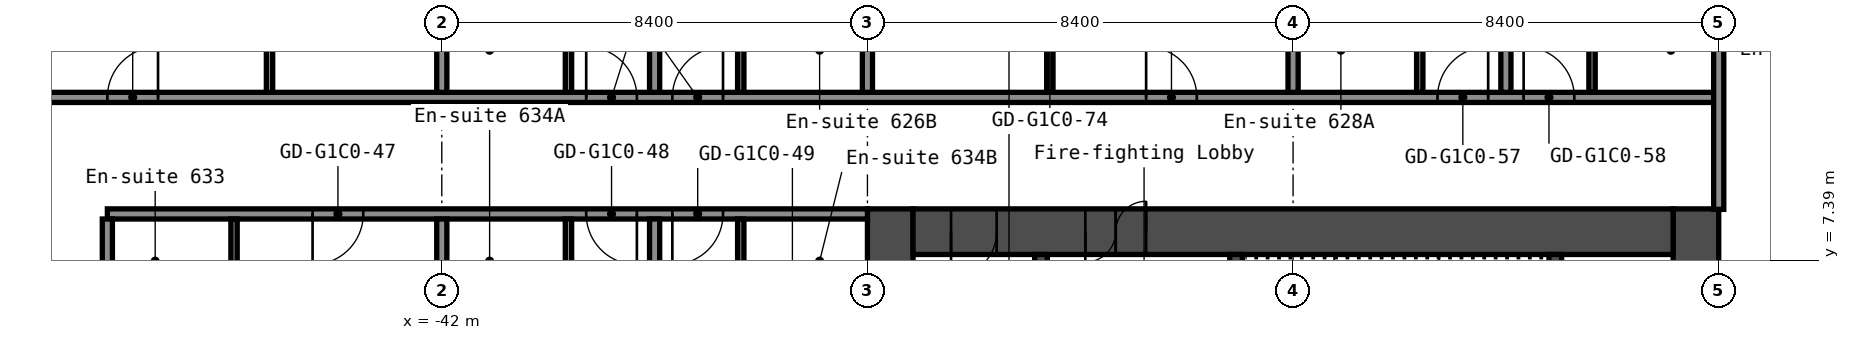
"""IFC4 building model, lengths in metres.
Left out: names, types, materials, properties, quantities, classifications, styles, units other than length and angle.
Written with IfcOpenShell. Run it as: python <this file> out.ifc"""

import sys

from ifc_helpers import new_model, si_unit, direction, frame, frame_2d, origin, place, context, subcontext, project, spatial, rectangle, extrude, element, fill, save


model = new_model("IFC4")
c1 = context("Model", 3, precision=1e-05, world=origin(), true_north=direction((0.0, 1.0)))
c2 = subcontext(c1, "Body", "Model", "MODEL_VIEW")
j1 = project(units=[si_unit("LENGTHUNIT", "METRE"), si_unit("PLANEANGLEUNIT", "RADIAN")], contexts=[c1])
p1 = place(None, origin())
s1 = spatial("IfcSite", under=j1, at=p1, CompositionType="ELEMENT")
p2 = place(p1, origin())
s2 = spatial("IfcBuilding", under=s1, at=p2, CompositionType="ELEMENT")
p3 = place(p2, frame((0.0, 0.0, 26.2)))
s3 = spatial("IfcBuildingStorey", under=s2, at=p3, CompositionType="ELEMENT", Elevation=26.2)
p4 = place(p3, frame((-17.25, -8.4, 0.0), z_axis=(0.0, 0.0, 1.0), x_axis=(0.0, 1.0, 0.0)))
e1 = element("IfcWall", 1, at=p4, inside=s3, PredefinedType="SHEAR", context=c2, shape_type="SweptSolid", body=[
    extrude(rectangle(XDim=16.8, YDim=0.9, at=frame_2d((8.4, 0.0))), origin(), (0.0, 0.0, 1.0), 2.8),
])
p5 = place(p4, frame((12.75, 0.0, 0.0)))
e2 = element("IfcOpeningElement", 2, at=p5, cuts=e1, PredefinedType="OPENING", context=c2, shape_type="SweptSolid", body=[
    extrude(rectangle(XDim=1.2, YDim=2.1, at=frame_2d((0.6, 1.05))), frame((0.0, 0.46, 0.0), z_axis=(0.0, -1.0, 0.0), x_axis=(1.0, 0.0, 0.0)), (0.0, 0.0, 1.0), 0.92),
])
p6 = place(p4, frame((2.85, 0.0, 0.0)))
e3 = element("IfcOpeningElement", 3, at=p6, cuts=e1, PredefinedType="OPENING", context=c2, shape_type="SweptSolid", body=[
    extrude(rectangle(XDim=1.2, YDim=2.1, at=frame_2d((0.6, 1.05))), frame((0.0, 0.46, 0.0), z_axis=(0.0, -1.0, 0.0), x_axis=(1.0, 0.0, 0.0)), (0.0, 0.0, 1.0), 0.92),
])
p7 = place(p3, frame((-33.15, -8.4, 0.0), z_axis=(0.0, 0.0, 1.0), x_axis=(0.0, 1.0, 0.0)))
e4 = element("IfcWall", 4, at=p7, inside=s3, PredefinedType="SHEAR", context=c2, shape_type="SweptSolid", body=[
    extrude(rectangle(XDim=16.8, YDim=0.9, at=frame_2d((8.4, 0.0))), origin(), (0.0, 0.0, 1.0), 2.8),
])
p8 = place(p3, frame((-32.7, 7.95, 0.0), z_axis=(0.0, 0.0, 1.0), x_axis=(1.0, 0.0, 0.0)))
e5 = element("IfcWall", 5, at=p8, inside=s3, PredefinedType="SHEAR", context=c2, shape_type="SweptSolid", body=[
    extrude(rectangle(XDim=15.0, YDim=0.9, at=frame_2d((7.5, 0.0))), origin(), (0.0, 0.0, 1.0), 2.8),
])
p9 = place(p8, frame((3.4, 0.0, 0.0)))
e6 = element("IfcOpeningElement", 6, at=p9, cuts=e5, PredefinedType="OPENING", context=c2, shape_type="SweptSolid", body=[
    extrude(rectangle(XDim=1.2, YDim=2.1, at=frame_2d((0.6, 1.05))), frame((0.0, 0.46, 0.0), z_axis=(0.0, -1.0, 0.0), x_axis=(1.0, 0.0, 0.0)), (0.0, 0.0, 1.0), 0.92),
])
p10 = place(p8, frame((0.75, 0.0, 0.0)))
e7 = element("IfcOpeningElement", 7, at=p10, cuts=e5, PredefinedType="OPENING", context=c2, shape_type="SweptSolid", body=[
    extrude(rectangle(XDim=0.9, YDim=2.1, at=frame_2d((0.45, 1.05))), frame((0.0, 0.46, 0.0), z_axis=(0.0, -1.0, 0.0), x_axis=(1.0, 0.0, 0.0)), (0.0, 0.0, 1.0), 0.92),
])
p11 = place(p3, frame((-20.025, 1.2, 0.0), z_axis=(0.0, 0.0, 1.0), x_axis=(0.0, 1.0, 0.0)))
e8 = element("IfcWall", 8, at=p11, inside=s3, PredefinedType="SHEAR", context=c2, shape_type="SweptSolid", body=[
    extrude(rectangle(XDim=6.3, YDim=0.25, at=frame_2d((3.15, 0.0))), origin(), (0.0, 0.0, 1.0), 2.8),
])
p12 = place(p3, frame((-26.325, 3.75, 0.0), z_axis=(0.0, 0.0, 1.0), x_axis=(0.0, 1.0, 0.0)))
e9 = element("IfcWall", 9, at=p12, inside=s3, PredefinedType="SHEAR", context=c2, shape_type="SweptSolid", body=[
    extrude(rectangle(XDim=3.75, YDim=0.25, at=frame_2d((1.875, 0.0))), origin(), (0.0, 0.0, 1.0), 2.8),
])
p13 = place(p12, frame((1.25, 0.0, 0.0)))
e10 = element("IfcOpeningElement", 10, at=p13, cuts=e9, PredefinedType="OPENING", context=c2, shape_type="SweptSolid", body=[
    extrude(rectangle(XDim=1.2, YDim=2.1, at=frame_2d((0.6, 1.05))), frame((0.0, 0.135, 0.0), z_axis=(0.0, -1.0, 0.0), x_axis=(1.0, 0.0, 0.0)), (0.0, 0.0, 1.0), 0.27),
])
p14 = place(p3, frame((-30.175, 1.45, 0.0), z_axis=(0.0, 0.0, 1.0), x_axis=(0.0, 1.0, 0.0)))
e11 = element("IfcWall", 11, at=p14, inside=s3, PredefinedType="SHEAR", context=c2, shape_type="SweptSolid", body=[
    extrude(rectangle(XDim=6.05, YDim=0.25, at=frame_2d((3.025, 0.0))), origin(), (0.0, 0.0, 1.0), 2.8),
])
p15 = place(p14, frame((2.625, 0.0, 0.0)))
e12 = element("IfcOpeningElement", 12, at=p15, cuts=e11, PredefinedType="OPENING", context=c2, shape_type="SweptSolid", body=[
    extrude(rectangle(XDim=1.1, YDim=2.1, at=frame_2d((0.55, 1.05))), frame((0.0, 0.135, 0.0), z_axis=(0.0, -1.0, 0.0), x_axis=(1.0, 0.0, 0.0)), (0.0, 0.0, 1.0), 0.27),
])
p16 = place(p3, frame((-48.6, 8.3, 0.0), z_axis=(0.0, 0.0, 1.0), x_axis=(1.0, 0.0, 0.0)))
e13 = element("IfcWall", 13, at=p16, inside=s3, PredefinedType="PARTITIONING", context=c2, shape_type="SweptSolid", body=[
    extrude(rectangle(XDim=15.0, YDim=0.2, at=frame_2d((7.5, 0.0))), origin(), (0.0, 0.0, 1.0), 2.8),
])
p17 = place(p16, frame((4.05, 0.0, 0.0)))
e14 = element("IfcOpeningElement", 14, at=p17, cuts=e13, PredefinedType="OPENING", context=c2, shape_type="SweptSolid", body=[
    extrude(rectangle(XDim=1.0, YDim=2.1, at=frame_2d((0.5, 1.05))), frame((0.0, 0.11, 0.0), z_axis=(0.0, -1.0, 0.0), x_axis=(1.0, 0.0, 0.0)), (0.0, 0.0, 1.0), 0.22),
])
p18 = place(p16, frame((9.45, 0.0, 0.0)))
e15 = element("IfcOpeningElement", 15, at=p18, cuts=e13, PredefinedType="OPENING", context=c2, shape_type="SweptSolid", body=[
    extrude(rectangle(XDim=1.0, YDim=2.1, at=frame_2d((0.5, 1.05))), frame((0.0, 0.11, 0.0), z_axis=(0.0, -1.0, 0.0), x_axis=(1.0, 0.0, 0.0)), (0.0, 0.0, 1.0), 0.22),
])
p19 = place(p16, frame((11.15, 0.0, 0.0)))
e16 = element("IfcOpeningElement", 16, at=p19, cuts=e13, PredefinedType="OPENING", context=c2, shape_type="SweptSolid", body=[
    extrude(rectangle(XDim=1.0, YDim=2.1, at=frame_2d((0.5, 1.05))), frame((0.0, 0.11, 0.0), z_axis=(0.0, -1.0, 0.0), x_axis=(1.0, 0.0, 0.0)), (0.0, 0.0, 1.0), 0.22),
])
p20 = place(p3, frame((-51.1, 10.6, 0.0), z_axis=(0.0, 0.0, 1.0), x_axis=(1.0, 0.0, 0.0)))
e17 = element("IfcWall", 17, at=p20, inside=s3, PredefinedType="PARTITIONING", context=c2, shape_type="SweptSolid", body=[
    extrude(rectangle(XDim=34.3, YDim=0.2, at=frame_2d((17.15, 0.0))), origin(), (0.0, 0.0, 1.0), 2.8),
])
p21 = place(p20, frame((2.5, 0.0, 0.0)))
e18 = element("IfcOpeningElement", 18, at=p21, cuts=e17, PredefinedType="OPENING", context=c2, shape_type="SweptSolid", body=[
    extrude(rectangle(XDim=1.0, YDim=2.1, at=frame_2d((0.5, 1.05))), frame((0.0, 0.11, 0.0), z_axis=(0.0, -1.0, 0.0), x_axis=(1.0, 0.0, 0.0)), (0.0, 0.0, 1.0), 0.22),
])
p22 = place(p20, frame((11.95, 0.0, 0.0)))
e19 = element("IfcOpeningElement", 19, at=p22, cuts=e17, PredefinedType="OPENING", context=c2, shape_type="SweptSolid", body=[
    extrude(rectangle(XDim=1.0, YDim=2.1, at=frame_2d((0.5, 1.05))), frame((0.0, 0.11, 0.0), z_axis=(0.0, -1.0, 0.0), x_axis=(1.0, 0.0, 0.0)), (0.0, 0.0, 1.0), 0.22),
])
p23 = place(p20, frame((13.65, 0.0, 0.0)))
e20 = element("IfcOpeningElement", 20, at=p23, cuts=e17, PredefinedType="OPENING", context=c2, shape_type="SweptSolid", body=[
    extrude(rectangle(XDim=1.0, YDim=2.1, at=frame_2d((0.5, 1.05))), frame((0.0, 0.11, 0.0), z_axis=(0.0, -1.0, 0.0), x_axis=(1.0, 0.0, 0.0)), (0.0, 0.0, 1.0), 0.22),
])
p24 = place(p20, frame((23.0, 0.0, 0.0)))
e21 = element("IfcOpeningElement", 21, at=p24, cuts=e17, PredefinedType="OPENING", context=c2, shape_type="SweptSolid", body=[
    extrude(rectangle(XDim=1.0, YDim=2.1, at=frame_2d((0.5, 1.05))), frame((0.0, 0.11, 0.0), z_axis=(0.0, -1.0, 0.0), x_axis=(1.0, 0.0, 0.0)), (0.0, 0.0, 1.0), 0.22),
])
p25 = place(p20, frame((28.75, 0.0, 0.0)))
e22 = element("IfcOpeningElement", 22, at=p25, cuts=e17, PredefinedType="OPENING", context=c2, shape_type="SweptSolid", body=[
    extrude(rectangle(XDim=1.0, YDim=2.1, at=frame_2d((0.5, 1.05))), frame((0.0, 0.11, 0.0), z_axis=(0.0, -1.0, 0.0), x_axis=(1.0, 0.0, 0.0)), (0.0, 0.0, 1.0), 0.22),
])
p26 = place(p20, frame((30.45, 0.0, 0.0)))
e23 = element("IfcOpeningElement", 23, at=p26, cuts=e17, PredefinedType="OPENING", context=c2, shape_type="SweptSolid", body=[
    extrude(rectangle(XDim=1.0, YDim=2.1, at=frame_2d((0.5, 1.05))), frame((0.0, 0.11, 0.0), z_axis=(0.0, -1.0, 0.0), x_axis=(1.0, 0.0, 0.0)), (0.0, 0.0, 1.0), 0.22),
])
p27 = place(p3, frame((-48.6, -8.2, 0.0), z_axis=(0.0, 0.0, 1.0), x_axis=(0.0, 1.0, 0.0)))
e24 = element("IfcWall", 24, at=p27, inside=s3, PredefinedType="PARTITIONING", context=c2, shape_type="SweptSolid", body=[
    extrude(rectangle(XDim=16.4, YDim=0.2, at=frame_2d((8.2, 0.0))), origin(), (0.0, 0.0, 1.0), 2.8),
])
p28 = place(p3, frame((-46.1, 5.3, 0.0), z_axis=(0.0, 0.0, 1.0), x_axis=(0.0, 1.0, 0.0)))
e25 = element("IfcWall", 25, at=p28, inside=s3, PredefinedType="PARTITIONING", context=c2, shape_type="SweptSolid", body=[
    extrude(rectangle(XDim=2.9, YDim=0.125, at=frame_2d((1.45, 0.0))), origin(), (0.0, 0.0, 1.0), 2.8),
])
p29 = place(p28, frame((0.6, 0.0, 0.0)))
e26 = element("IfcOpeningElement", 26, at=p29, cuts=e25, PredefinedType="OPENING", context=c2, shape_type="SweptSolid", body=[
    extrude(rectangle(XDim=0.8, YDim=2.1, at=frame_2d((0.4, 1.05))), frame((0.0, 0.073, 0.0), z_axis=(0.0, -1.0, 0.0), x_axis=(1.0, 0.0, 0.0)), (0.0, 0.0, 1.0), 0.145),
])
p30 = place(p3, frame((-45.4, 10.7, 0.0), z_axis=(0.0, 0.0, 1.0), x_axis=(0.0, 1.0, 0.0)))
e27 = element("IfcWall", 27, at=p30, inside=s3, PredefinedType="PARTITIONING", context=c2, shape_type="SweptSolid", body=[
    extrude(rectangle(XDim=3.3, YDim=0.125, at=frame_2d((1.65, 0.0))), origin(), (0.0, 0.0, 1.0), 2.8),
])
p31 = place(p3, frame((-42.0, -8.2, 0.0), z_axis=(0.0, 0.0, 1.0), x_axis=(0.0, 1.0, 0.0)))
e28 = element("IfcWall", 28, at=p31, inside=s3, PredefinedType="PARTITIONING", context=c2, shape_type="SweptSolid", body=[
    extrude(rectangle(XDim=16.4, YDim=0.2, at=frame_2d((8.2, 0.0))), origin(), (0.0, 0.0, 1.0), 2.8),
])
p32 = place(p3, frame((-42.0, 10.7, 0.0), z_axis=(0.0, 0.0, 1.0), x_axis=(0.0, 1.0, 0.0)))
e29 = element("IfcWall", 29, at=p32, inside=s3, PredefinedType="PARTITIONING", context=c2, shape_type="SweptSolid", body=[
    extrude(rectangle(XDim=9.6, YDim=0.2, at=frame_2d((4.8, 0.0))), origin(), (0.0, 0.0, 1.0), 2.8),
])
p33 = place(p3, frame((-39.5, 5.3, 0.0), z_axis=(0.0, 0.0, 1.0), x_axis=(0.0, 1.0, 0.0)))
e30 = element("IfcWall", 30, at=p33, inside=s3, PredefinedType="PARTITIONING", context=c2, shape_type="SweptSolid", body=[
    extrude(rectangle(XDim=2.9, YDim=0.125, at=frame_2d((1.45, 0.0))), origin(), (0.0, 0.0, 1.0), 2.8),
])
p34 = place(p33, frame((0.6, 0.0, 0.0)))
e31 = element("IfcOpeningElement", 31, at=p34, cuts=e30, PredefinedType="OPENING", context=c2, shape_type="SweptSolid", body=[
    extrude(rectangle(XDim=0.8, YDim=2.1, at=frame_2d((0.4, 1.05))), frame((0.0, 0.073, 0.0), z_axis=(0.0, -1.0, 0.0), x_axis=(1.0, 0.0, 0.0)), (0.0, 0.0, 1.0), 0.145),
])
p35 = place(p3, frame((-39.5, 10.7, 0.0), z_axis=(0.0, 0.0, 1.0), x_axis=(0.0, 1.0, 0.0)))
e32 = element("IfcWall", 32, at=p35, inside=s3, PredefinedType="PARTITIONING", context=c2, shape_type="SweptSolid", body=[
    extrude(rectangle(XDim=2.9, YDim=0.125, at=frame_2d((1.45, 0.0))), origin(), (0.0, 0.0, 1.0), 2.8),
])
p36 = place(p35, frame((1.5, 0.0, 0.0)))
e33 = element("IfcOpeningElement", 33, at=p36, cuts=e32, PredefinedType="OPENING", context=c2, shape_type="SweptSolid", body=[
    extrude(rectangle(XDim=0.8, YDim=2.1, at=frame_2d((0.4, 1.05))), frame((0.0, 0.073, 0.0), z_axis=(0.0, -1.0, 0.0), x_axis=(1.0, 0.0, 0.0)), (0.0, 0.0, 1.0), 0.145),
])
p37 = place(p3, frame((-37.8, 0.0, 0.0), z_axis=(0.0, 0.0, 1.0), x_axis=(0.0, 1.0, 0.0)))
e34 = element("IfcWall", 34, at=p37, inside=s3, PredefinedType="PARTITIONING", context=c2, shape_type="SweptSolid", body=[
    extrude(rectangle(XDim=8.2, YDim=0.2, at=frame_2d((4.1, 0.0))), origin(), (0.0, 0.0, 1.0), 2.8),
])
p38 = place(p3, frame((-37.8, 10.7, 0.0), z_axis=(0.0, 0.0, 1.0), x_axis=(0.0, 1.0, 0.0)))
e35 = element("IfcWall", 35, at=p38, inside=s3, PredefinedType="PARTITIONING", context=c2, shape_type="SweptSolid", body=[
    extrude(rectangle(XDim=9.6, YDim=0.2, at=frame_2d((4.8, 0.0))), origin(), (0.0, 0.0, 1.0), 2.8),
])
p39 = place(p3, frame((-36.1, 5.3, 0.0), z_axis=(0.0, 0.0, 1.0), x_axis=(0.0, 1.0, 0.0)))
e36 = element("IfcWall", 36, at=p39, inside=s3, PredefinedType="PARTITIONING", context=c2, shape_type="SweptSolid", body=[
    extrude(rectangle(XDim=2.9, YDim=0.125, at=frame_2d((1.45, 0.0))), origin(), (0.0, 0.0, 1.0), 2.8),
])
p40 = place(p39, frame((0.6, 0.0, 0.0)))
e37 = element("IfcOpeningElement", 37, at=p40, cuts=e36, PredefinedType="OPENING", context=c2, shape_type="SweptSolid", body=[
    extrude(rectangle(XDim=0.8, YDim=2.1, at=frame_2d((0.4, 1.05))), frame((0.0, 0.073, 0.0), z_axis=(0.0, -1.0, 0.0), x_axis=(1.0, 0.0, 0.0)), (0.0, 0.0, 1.0), 0.145),
])
p41 = place(p3, frame((-36.1, 10.7, 0.0), z_axis=(0.0, 0.0, 1.0), x_axis=(0.0, 1.0, 0.0)))
e38 = element("IfcWall", 38, at=p41, inside=s3, PredefinedType="PARTITIONING", context=c2, shape_type="SweptSolid", body=[
    extrude(rectangle(XDim=2.9, YDim=0.125, at=frame_2d((1.45, 0.0))), origin(), (0.0, 0.0, 1.0), 2.8),
])
p42 = place(p41, frame((1.5, 0.0, 0.0)))
e39 = element("IfcOpeningElement", 39, at=p42, cuts=e38, PredefinedType="OPENING", context=c2, shape_type="SweptSolid", body=[
    extrude(rectangle(XDim=0.8, YDim=2.1, at=frame_2d((0.4, 1.05))), frame((0.0, 0.073, 0.0), z_axis=(0.0, -1.0, 0.0), x_axis=(1.0, 0.0, 0.0)), (0.0, 0.0, 1.0), 0.145),
])
p43 = place(p3, frame((-33.6, 10.7, 0.0), z_axis=(0.0, 0.0, 1.0), x_axis=(0.0, 1.0, 0.0)))
e40 = element("IfcWall", 40, at=p43, inside=s3, PredefinedType="PARTITIONING", context=c2, shape_type="SweptSolid", body=[
    extrude(rectangle(XDim=9.6, YDim=0.2, at=frame_2d((4.8, 0.0))), origin(), (0.0, 0.0, 1.0), 2.8),
])
p44 = place(p3, frame((-30.0, 10.7, 0.0), z_axis=(0.0, 0.0, 1.0), x_axis=(0.0, 1.0, 0.0)))
e41 = element("IfcWall", 41, at=p44, inside=s3, PredefinedType="PARTITIONING", context=c2, shape_type="SweptSolid", body=[
    extrude(rectangle(XDim=3.3, YDim=0.125, at=frame_2d((1.65, 0.0))), origin(), (0.0, 0.0, 1.0), 2.8),
])
p45 = place(p44, frame((1.1, 0.0, 0.0)))
e42 = element("IfcOpeningElement", 42, at=p45, cuts=e41, PredefinedType="OPENING", context=c2, shape_type="SweptSolid", body=[
    extrude(rectangle(XDim=1.0, YDim=2.1, at=frame_2d((0.5, 1.05))), frame((0.0, 0.073, 0.0), z_axis=(0.0, -1.0, 0.0), x_axis=(1.0, 0.0, 0.0)), (0.0, 0.0, 1.0), 0.145),
])
p46 = place(p3, frame((-25.2, 10.7, 0.0), z_axis=(0.0, 0.0, 1.0), x_axis=(0.0, 1.0, 0.0)))
e43 = element("IfcWall", 43, at=p46, inside=s3, PredefinedType="PARTITIONING", context=c2, shape_type="SweptSolid", body=[
    extrude(rectangle(XDim=9.6, YDim=0.2, at=frame_2d((4.8, 0.0))), origin(), (0.0, 0.0, 1.0), 2.8),
])
p47 = place(p3, frame((-22.7, 10.7, 0.0), z_axis=(0.0, 0.0, 1.0), x_axis=(0.0, 1.0, 0.0)))
e44 = element("IfcWall", 44, at=p47, inside=s3, PredefinedType="PARTITIONING", context=c2, shape_type="SweptSolid", body=[
    extrude(rectangle(XDim=2.9, YDim=0.125, at=frame_2d((1.45, 0.0))), origin(), (0.0, 0.0, 1.0), 2.8),
])
p48 = place(p47, frame((1.5, 0.0, 0.0)))
e45 = element("IfcOpeningElement", 45, at=p48, cuts=e44, PredefinedType="OPENING", context=c2, shape_type="SweptSolid", body=[
    extrude(rectangle(XDim=0.8, YDim=2.1, at=frame_2d((0.4, 1.05))), frame((0.0, 0.073, 0.0), z_axis=(0.0, -1.0, 0.0), x_axis=(1.0, 0.0, 0.0)), (0.0, 0.0, 1.0), 0.145),
])
p49 = place(p3, frame((-21.0, 10.7, 0.0), z_axis=(0.0, 0.0, 1.0), x_axis=(0.0, 1.0, 0.0)))
e46 = element("IfcWall", 46, at=p49, inside=s3, PredefinedType="PARTITIONING", context=c2, shape_type="SweptSolid", body=[
    extrude(rectangle(XDim=9.6, YDim=0.2, at=frame_2d((4.8, 0.0))), origin(), (0.0, 0.0, 1.0), 2.8),
])
p50 = place(p3, frame((-19.3, 10.7, 0.0), z_axis=(0.0, 0.0, 1.0), x_axis=(0.0, 1.0, 0.0)))
e47 = element("IfcWall", 47, at=p50, inside=s3, PredefinedType="PARTITIONING", context=c2, shape_type="SweptSolid", body=[
    extrude(rectangle(XDim=2.9, YDim=0.125, at=frame_2d((1.45, 0.0))), origin(), (0.0, 0.0, 1.0), 2.8),
])
p51 = place(p50, frame((1.5, 0.0, 0.0)))
e48 = element("IfcOpeningElement", 48, at=p51, cuts=e47, PredefinedType="OPENING", context=c2, shape_type="SweptSolid", body=[
    extrude(rectangle(XDim=0.8, YDim=2.1, at=frame_2d((0.4, 1.05))), frame((0.0, 0.073, 0.0), z_axis=(0.0, -1.0, 0.0), x_axis=(1.0, 0.0, 0.0)), (0.0, 0.0, 1.0), 0.145),
])
p52 = place(p3, frame((-16.8, 8.39, 0.0), z_axis=(0.0, 0.0, 1.0), x_axis=(0.0, 1.0, 0.0)))
e49 = element("IfcWall", 49, at=p52, inside=s3, PredefinedType="PARTITIONING", context=c2, shape_type="SweptSolid", body=[
    extrude(rectangle(XDim=11.91, YDim=0.2, at=frame_2d((5.955, 0.0))), origin(), (0.0, 0.0, 1.0), 2.8),
])
p53 = place(p9, origin())
e50 = element("IfcDoor", 50, at=p53, inside=s3, OperationType="DOUBLE_DOOR_SINGLE_SWING", PredefinedType="DOOR", context=c2, shape_type="SweptSolid", body=[
    extrude(rectangle(XDim=1.2, YDim=2.1, at=frame_2d((0.6, 1.05))), frame((0.0, 0.025, 0.0), z_axis=(0.0, -1.0, 0.0), x_axis=(1.0, 0.0, 0.0)), (0.0, 0.0, 1.0), 0.05),
])
fill(e6, e50)
p54 = place(p10, origin())
e51 = element("IfcDoor", 51, at=p54, inside=s3, OperationType="SINGLE_SWING_LEFT", PredefinedType="DOOR", context=c2, shape_type="SweptSolid", body=[
    extrude(rectangle(XDim=0.9, YDim=2.1, at=frame_2d((0.45, 1.05))), frame((0.0, 0.025, 0.0), z_axis=(0.0, -1.0, 0.0), x_axis=(1.0, 0.0, 0.0)), (0.0, 0.0, 1.0), 0.05),
])
fill(e7, e51)
p55 = place(p17, origin())
e52 = element("IfcDoor", 52, at=p55, inside=s3, OperationType="SINGLE_SWING_LEFT", PredefinedType="DOOR", context=c2, shape_type="SweptSolid", body=[
    extrude(rectangle(XDim=1.0, YDim=2.1, at=frame_2d((0.5, 1.05))), frame((0.0, 0.025, 0.0), z_axis=(0.0, -1.0, 0.0), x_axis=(1.0, 0.0, 0.0)), (0.0, 0.0, 1.0), 0.05),
])
fill(e14, e52)
p56 = place(p18, origin())
e53 = element("IfcDoor", 53, at=p56, inside=s3, OperationType="SINGLE_SWING_RIGHT", PredefinedType="DOOR", context=c2, shape_type="SweptSolid", body=[
    extrude(rectangle(XDim=1.0, YDim=2.1, at=frame_2d((0.5, 1.05))), frame((0.0, 0.025, 0.0), z_axis=(0.0, -1.0, 0.0), x_axis=(1.0, 0.0, 0.0)), (0.0, 0.0, 1.0), 0.05),
])
fill(e15, e53)
p57 = place(p19, origin())
e54 = element("IfcDoor", 54, at=p57, inside=s3, OperationType="SINGLE_SWING_LEFT", PredefinedType="DOOR", context=c2, shape_type="SweptSolid", body=[
    extrude(rectangle(XDim=1.0, YDim=2.1, at=frame_2d((0.5, 1.05))), frame((0.0, 0.025, 0.0), z_axis=(0.0, -1.0, 0.0), x_axis=(1.0, 0.0, 0.0)), (0.0, 0.0, 1.0), 0.05),
])
fill(e16, e54)
p58 = place(p21, origin())
e55 = element("IfcDoor", 55, at=p58, inside=s3, OperationType="SINGLE_SWING_LEFT", PredefinedType="DOOR", context=c2, shape_type="SweptSolid", body=[
    extrude(rectangle(XDim=1.0, YDim=2.1, at=frame_2d((0.5, 1.05))), frame((0.0, 0.025, 0.0), z_axis=(0.0, -1.0, 0.0), x_axis=(1.0, 0.0, 0.0)), (0.0, 0.0, 1.0), 0.05),
])
fill(e18, e55)
p59 = place(p22, origin())
e56 = element("IfcDoor", 56, at=p59, inside=s3, OperationType="SINGLE_SWING_RIGHT", PredefinedType="DOOR", context=c2, shape_type="SweptSolid", body=[
    extrude(rectangle(XDim=1.0, YDim=2.1, at=frame_2d((0.5, 1.05))), frame((0.0, 0.025, 0.0), z_axis=(0.0, -1.0, 0.0), x_axis=(1.0, 0.0, 0.0)), (0.0, 0.0, 1.0), 0.05),
])
fill(e19, e56)
p60 = place(p23, origin())
e57 = element("IfcDoor", 57, at=p60, inside=s3, OperationType="SINGLE_SWING_LEFT", PredefinedType="DOOR", context=c2, shape_type="SweptSolid", body=[
    extrude(rectangle(XDim=1.0, YDim=2.1, at=frame_2d((0.5, 1.05))), frame((0.0, 0.025, 0.0), z_axis=(0.0, -1.0, 0.0), x_axis=(1.0, 0.0, 0.0)), (0.0, 0.0, 1.0), 0.05),
])
fill(e20, e57)
p61 = place(p24, origin())
e58 = element("IfcDoor", 58, at=p61, inside=s3, OperationType="SINGLE_SWING_RIGHT", PredefinedType="DOOR", context=c2, shape_type="SweptSolid", body=[
    extrude(rectangle(XDim=1.0, YDim=2.1, at=frame_2d((0.5, 1.05))), frame((0.0, 0.025, 0.0), z_axis=(0.0, -1.0, 0.0), x_axis=(1.0, 0.0, 0.0)), (0.0, 0.0, 1.0), 0.05),
])
fill(e21, e58)
p62 = place(p25, origin())
e59 = element("IfcDoor", 59, at=p62, inside=s3, OperationType="SINGLE_SWING_LEFT", PredefinedType="DOOR", context=c2, shape_type="SweptSolid", body=[
    extrude(rectangle(XDim=1.0, YDim=2.1, at=frame_2d((0.5, 1.05))), frame((0.0, 0.025, 0.0), z_axis=(0.0, -1.0, 0.0), x_axis=(1.0, 0.0, 0.0)), (0.0, 0.0, 1.0), 0.05),
])
fill(e22, e59)
p63 = place(p26, origin())
e60 = element("IfcDoor", 60, at=p63, inside=s3, OperationType="SINGLE_SWING_RIGHT", PredefinedType="DOOR", context=c2, shape_type="SweptSolid", body=[
    extrude(rectangle(XDim=1.0, YDim=2.1, at=frame_2d((0.5, 1.05))), frame((0.0, 0.025, 0.0), z_axis=(0.0, -1.0, 0.0), x_axis=(1.0, 0.0, 0.0)), (0.0, 0.0, 1.0), 0.05),
])
fill(e23, e60)
save(model, sys.argv[1])
